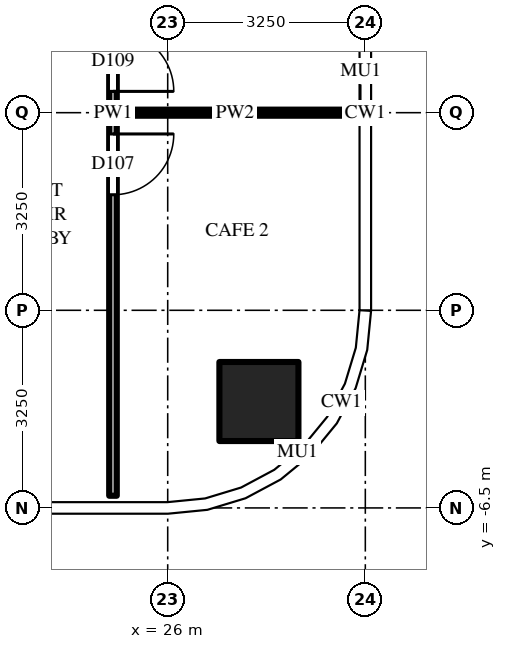
"""IFC4 building model, lengths in metres.
Left out: names, types, materials, properties, quantities, classifications, styles, units other than length and angle.
Written with IfcOpenShell. Run it as: python <this file> out.ifc"""

import sys

from ifc_helpers import new_model, si_unit, direction, frame, frame_2d, origin, origin_2d, place, context, subcontext, project, spatial, rectangle, extrude, source, transform, mapped, element, fill, save


model = new_model("IFC4")
c1 = context("Model", 3, precision=1e-05, world=origin(), true_north=direction((0.0, 1.0)))
c2 = subcontext(c1, "Body", "Model", "MODEL_VIEW")
j1 = project(units=[si_unit("LENGTHUNIT", "METRE"), si_unit("PLANEANGLEUNIT", "RADIAN")], contexts=[c1])
p1 = place(None, origin())
s1 = spatial("IfcSite", under=j1, at=p1, CompositionType="ELEMENT")
p2 = place(p1, origin())
s2 = spatial("IfcBuilding", under=s1, at=p2, CompositionType="ELEMENT")
p3 = place(p2, frame((0.0, 0.0, 142.5)))
s3 = spatial("IfcBuildingStorey", under=s2, at=p3, CompositionType="ELEMENT", Elevation=142.5)
m1 = source(origin(), c2, "Body", "SweptSolid", [
    extrude(rectangle(XDim=1.3, YDim=1.3, at=origin_2d()), origin(), (0.0, 0.0, 1.0), 4.5),
])
p4 = place(p3, frame((27.5, -4.75, 0.0), z_axis=(0.0, 0.0, 1.0), x_axis=(1.0, 0.0, 0.0)))
e1 = element("IfcColumn", 1, at=p4, inside=s3, PredefinedType="COLUMN", context=c2, shape_type="MappedRepresentation", body=[
    mapped(m1, transform((0.0, 0.0, 0.0))),
])
m2 = source(origin(), c2, "Body", "SweptSolid", [
    extrude(rectangle(XDim=12.6, YDim=0.125, at=frame_2d((6.3, 0.0))), origin(), (0.0, 0.0, 1.0), 3.33),
])
p5 = place(p3, frame((25.1, 6.3, 0.0), z_axis=(0.0, 0.0, 1.0), x_axis=(0.0, -1.0, 0.0)))
e2 = element("IfcWall", 2, at=p5, inside=s3, PredefinedType="PARTITIONING", context=c2, shape_type="MappedRepresentation", body=[
    mapped(m2, transform((0.0, 0.0, 0.0))),
])
m3 = source(origin(), c2, "Body", "SweptSolid", [
    extrude(rectangle(XDim=1.0, YDim=2.1, at=frame_2d((0.5, 1.05))), frame((0.0, 0.073, 0.0), z_axis=(0.0, -1.0, 0.0), x_axis=(1.0, 0.0, 0.0)), (0.0, 0.0, 1.0), 0.145),
])
p6 = place(p5, frame((6.65, 0.0, 0.0)))
e3 = element("IfcOpeningElement", 3, at=p6, cuts=e2, PredefinedType="OPENING", context=c2, shape_type="MappedRepresentation", body=[
    mapped(m3, transform((0.0, 0.0, 0.0))),
])
p7 = place(p5, frame((4.95, 0.0, 0.0)))
e4 = element("IfcOpeningElement", 4, at=p7, cuts=e2, PredefinedType="OPENING", context=c2, shape_type="MappedRepresentation", body=[
    mapped(m3, transform((0.0, 0.0, 0.0))),
])
m4 = source(origin(), c2, "Body", "SweptSolid", [
    extrude(rectangle(XDim=3.887, YDim=0.1, at=frame_2d((1.944, 0.0))), origin(), (0.0, 0.0, 1.0), 3.33),
])
p8 = place(p3, frame((25.163, 0.0, 0.0), z_axis=(0.0, 0.0, 1.0), x_axis=(1.0, 0.0, 0.0)))
e5 = element("IfcWall", 5, at=p8, inside=s3, PredefinedType="PARTITIONING", context=c2, shape_type="MappedRepresentation", body=[
    mapped(m4, transform((0.0, 0.0, 0.0))),
])
m5 = source(origin(), c2, "Body", "SweptSolid", [
    extrude(rectangle(XDim=1.0, YDim=2.1, at=frame_2d((0.5, 1.05))), frame((0.0, 0.025, 0.0), z_axis=(0.0, -1.0, 0.0), x_axis=(1.0, 0.0, 0.0)), (0.0, 0.0, 1.0), 0.05),
])
p9 = place(p6, origin())
e6 = element("IfcDoor", 6, at=p9, inside=s3, OperationType="SINGLE_SWING_LEFT", PredefinedType="DOOR", context=c2, shape_type="MappedRepresentation", body=[
    mapped(m5, transform((0.0, 0.0, 0.0))),
])
fill(e3, e6)
p10 = place(p7, origin())
e7 = element("IfcDoor", 7, at=p10, inside=s3, OperationType="SINGLE_SWING_RIGHT", PredefinedType="DOOR", context=c2, shape_type="MappedRepresentation", body=[
    mapped(m5, transform((0.0, 0.0, 0.0))),
])
fill(e4, e7)
save(model, sys.argv[1])
